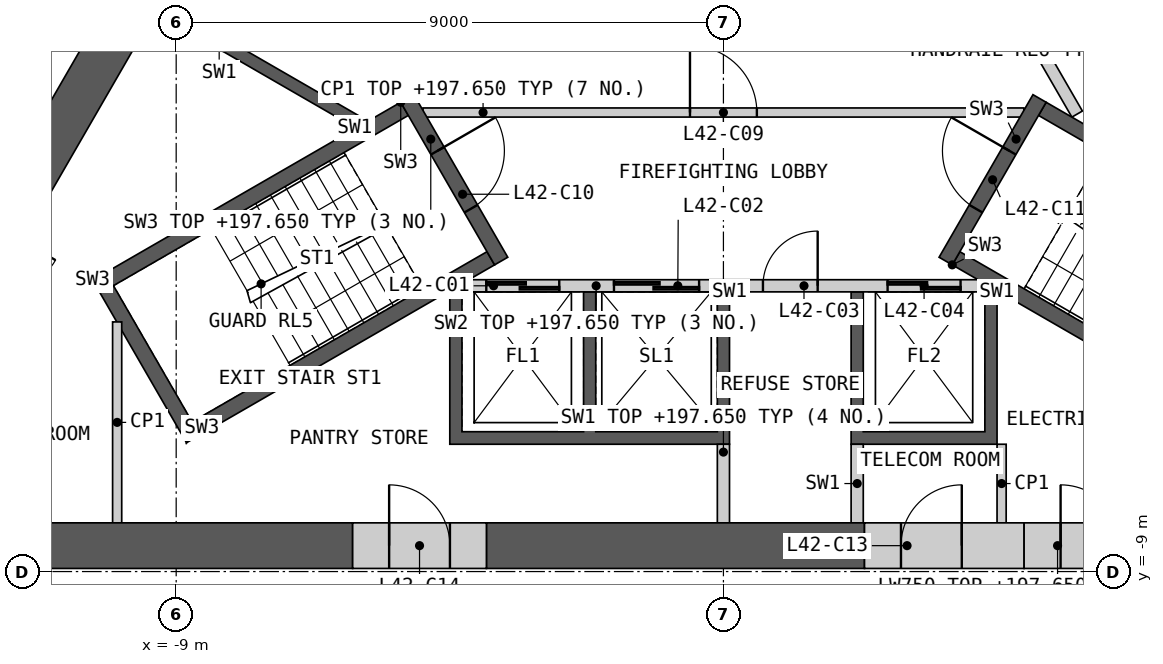
"""IFC4 building model, lengths in metres.
Left out: names, types, materials, properties, quantities, classifications, styles, units other than length and angle.
Written with IfcOpenShell. Run it as: python <this file> out.ifc"""

import sys

from ifc_helpers import new_model, si_unit, direction, frame, frame_2d, origin, place, context, subcontext, project, spatial, polyline, rectangle, outline, extrude, element, fill, save


model = new_model("IFC4")
c1 = context("Model", 3, precision=1e-05, world=origin(), true_north=direction((0.0, 1.0)))
c2 = subcontext(c1, "Body", "Model", "MODEL_VIEW")
j1 = project(units=[si_unit("LENGTHUNIT", "METRE"), si_unit("PLANEANGLEUNIT", "RADIAN")], contexts=[c1])
p1 = place(None, origin())
s1 = spatial("IfcSite", under=j1, at=p1, CompositionType="ELEMENT")
p2 = place(p1, origin())
s2 = spatial("IfcBuilding", under=s1, at=p2, CompositionType="ELEMENT")
p3 = place(p2, frame((0.0, 0.0, 194.4)))
s3 = spatial("IfcBuildingStorey", under=s2, at=p3, CompositionType="ELEMENT", Elevation=194.4)
p4 = place(p3, origin())
e1 = element("IfcWall", 1, at=p4, inside=s3, PredefinedType="SHEAR", context=c2, shape_type="SweptSolid", body=[
    extrude(outline(polyline([(4.5, -4.4), (4.5, -6.906), (2.1, -6.906), (2.1, -4.4), (2.3, -4.4), (2.3, -6.7), (4.3, -6.7), (4.3, -4.4), (4.5, -4.4)])), origin(), (0.0, 0.0, 1.0), 3.25),
])
p5 = place(p3, origin())
e2 = element("IfcWall", 2, at=p5, inside=s3, PredefinedType="SHEAR", context=c2, shape_type="SweptSolid", body=[
    extrude(outline(polyline([(0.1, -4.4), (0.1, -6.906), (-4.5, -6.906), (-4.5, -4.4), (-4.3, -4.4), (-4.3, -6.7), (-2.3, -6.7), (-2.3, -4.4), (-2.1, -4.4), (-2.1, -6.7), (-0.1, -6.7), (-0.1, -4.4), (0.1, -4.4)])), origin(), (0.0, 0.0, 1.0), 3.25),
])
p6 = place(p3, frame((-4.187, -4.3, 0.0), z_axis=(0.0, 0.0, 1.0), x_axis=(1.0, 0.0, 0.0)))
e3 = element("IfcWall", 3, at=p6, inside=s3, PredefinedType="SOLIDWALL", context=c2, shape_type="SweptSolid", body=[
    extrude(rectangle(XDim=8.373, YDim=0.2, at=frame_2d((4.187, 0.0))), origin(), (0.0, 0.0, 1.0), 3.25),
])
p7 = place(p6, frame((0.287, 0.0, 0.0)))
e4 = element("IfcOpeningElement", 4, at=p7, cuts=e3, PredefinedType="OPENING", context=c2, shape_type="SweptSolid", body=[
    extrude(rectangle(XDim=1.2, YDim=2.1, at=frame_2d((0.6, 1.05))), frame((0.0, 0.11, 0.0), z_axis=(0.0, -1.0, 0.0), x_axis=(1.0, 0.0, 0.0)), (0.0, 0.0, 1.0), 0.22),
])
p8 = place(p6, frame((2.387, 0.0, 0.0)))
e5 = element("IfcOpeningElement", 5, at=p8, cuts=e3, PredefinedType="OPENING", context=c2, shape_type="SweptSolid", body=[
    extrude(rectangle(XDim=1.4, YDim=2.1, at=frame_2d((0.7, 1.05))), frame((0.0, 0.11, 0.0), z_axis=(0.0, -1.0, 0.0), x_axis=(1.0, 0.0, 0.0)), (0.0, 0.0, 1.0), 0.22),
])
p9 = place(p6, frame((4.837, 0.0, 0.0)))
e6 = element("IfcOpeningElement", 6, at=p9, cuts=e3, PredefinedType="OPENING", context=c2, shape_type="SweptSolid", body=[
    extrude(rectangle(XDim=0.9, YDim=2.1, at=frame_2d((0.45, 1.05))), frame((0.0, 0.11, 0.0), z_axis=(0.0, -1.0, 0.0), x_axis=(1.0, 0.0, 0.0)), (0.0, 0.0, 1.0), 0.22),
])
p10 = place(p6, frame((6.887, 0.0, 0.0)))
e7 = element("IfcOpeningElement", 7, at=p10, cuts=e3, PredefinedType="OPENING", context=c2, shape_type="SweptSolid", body=[
    extrude(rectangle(XDim=1.2, YDim=2.1, at=frame_2d((0.6, 1.05))), frame((0.0, 0.11, 0.0), z_axis=(0.0, -1.0, 0.0), x_axis=(1.0, 0.0, 0.0)), (0.0, 0.0, 1.0), 0.22),
])
for number, where, z_axis, x_axis in (
    (8, (0.0, -6.906, 0.0), (0.0, 0.0, 1.0), (0.0, -1.0, 0.0)),
    (9, (2.2, -6.906, 0.0), (0.0, 0.0, 1.0), (0.0, -1.0, 0.0)),
):
    element("IfcWall", number, at=place(p3, frame(where, z_axis=z_axis, x_axis=x_axis)), inside=s3, PredefinedType="SHEAR", context=c2, shape_type="SweptSolid", body=[
        extrude(rectangle(XDim=1.293, YDim=0.2, at=frame_2d((0.646, 0.0))), origin(), (0.0, 0.0, 1.0), 3.25),
    ])
p11 = place(p3, origin())
e10 = element("IfcWall", 10, at=p11, inside=s3, PredefinedType="SHEAR", context=c2, shape_type="SweptSolid", body=[
    extrude(outline(polyline([(1.561, 6.097), (3.731, 7.35), (8.231, -0.444), (6.061, -1.697), (5.96, -1.524), (7.952, -0.374), (4.752, 5.169), (2.76, 4.019), (2.66, 4.192), (4.652, 5.342), (3.652, 7.074), (1.66, 5.924), (1.561, 6.097)])), origin(), (0.0, 0.0, 1.0), 3.25),
])
p12 = place(p3, frame((5.817, -1.476, 0.0), z_axis=(0.0, 0.0, 1.0), x_axis=(-0.500002616675, 0.866023893041, 0.0)))
e11 = element("IfcWall", 11, at=p12, inside=s3, PredefinedType="SOLIDWALL", context=c2, shape_type="SweptSolid", body=[
    extrude(rectangle(XDim=8.373, YDim=0.2, at=frame_2d((4.187, 0.0))), origin(), (0.0, 0.0, 1.0), 3.25),
])
p13 = place(p12, frame((2.637, 0.0, 0.0)))
e12 = element("IfcOpeningElement", 12, at=p13, cuts=e11, PredefinedType="OPENING", context=c2, shape_type="SweptSolid", body=[
    extrude(rectangle(XDim=0.9, YDim=2.1, at=frame_2d((0.45, 1.05))), frame((0.0, 0.11, 0.0), z_axis=(0.0, -1.0, 0.0), x_axis=(1.0, 0.0, 0.0)), (0.0, 0.0, 1.0), 0.22),
])
p14 = place(p12, frame((6.937, 0.0, 0.0)))
e13 = element("IfcOpeningElement", 13, at=p14, cuts=e11, PredefinedType="OPENING", context=c2, shape_type="SweptSolid", body=[
    extrude(rectangle(XDim=1.1, YDim=2.1, at=frame_2d((0.55, 1.05))), frame((0.0, 0.11, 0.0), z_axis=(0.0, -1.0, 0.0), x_axis=(1.0, 0.0, 0.0)), (0.0, 0.0, 1.0), 0.22),
])
p15 = place(p3, origin())
e14 = element("IfcWall", 14, at=p15, inside=s3, PredefinedType="SHEAR", context=c2, shape_type="SweptSolid", body=[
    extrude(outline(polyline([(-6.061, -1.697), (-8.231, -0.444), (-8.131, -0.271), (-5.96, -1.524), (-6.061, -1.697)])), origin(), (0.0, 0.0, 1.0), 3.25),
])
p16 = place(p3, frame((-4.941, -1.45, 0.0), z_axis=(0.0, 0.0, 1.0), x_axis=(1.0, 0.0, 0.0)))
e15 = element("IfcWall", 15, at=p16, inside=s3, PredefinedType="PARTITIONING", context=c2, shape_type="SweptSolid", body=[
    extrude(rectangle(XDim=9.882, YDim=0.15, at=frame_2d((4.941, 0.0))), origin(), (0.0, 0.0, 1.0), 3.25),
])
p17 = place(p16, frame((4.391, 0.0, 0.0)))
e16 = element("IfcOpeningElement", 16, at=p17, cuts=e15, PredefinedType="OPENING", context=c2, shape_type="SweptSolid", body=[
    extrude(rectangle(XDim=1.1, YDim=2.1, at=frame_2d((0.55, 1.05))), frame((0.0, 0.085, 0.0), z_axis=(0.0, -1.0, 0.0), x_axis=(1.0, 0.0, 0.0)), (0.0, 0.0, 1.0), 0.17),
])
p18 = place(p3, origin())
e17 = element("IfcWall", 17, at=p18, inside=s3, PredefinedType="SHEAR", context=c2, shape_type="SweptSolid", body=[
    extrude(outline(polyline([(-5.307, -1.281), (-10.374, -4.206), (-10.032, -4.298), (-5.182, -1.498), (-5.307, -1.281)])), origin(), (0.0, 0.0, 1.0), 3.25),
])
p19 = place(p3, origin())
e18 = element("IfcWall", 18, at=p19, inside=s3, PredefinedType="SHEAR", context=c2, shape_type="SweptSolid", body=[
    extrude(outline(polyline([(-10.374, -4.206), (-8.83, -6.881), (-8.738, -6.539), (-10.032, -4.298), (-10.374, -4.206)])), origin(), (0.0, 0.0, 1.0), 3.25),
])
p20 = place(p3, origin())
e19 = element("IfcWall", 19, at=p20, inside=s3, PredefinedType="SHEAR", context=c2, shape_type="SweptSolid", body=[
    extrude(outline(polyline([(-8.738, -6.539), (-8.83, -6.881), (-3.763, -3.956), (-3.888, -3.739), (-8.738, -6.539)])), origin(), (0.0, 0.0, 1.0), 3.25),
])
p21 = place(p3, frame((-5.199, -1.219, 0.0), z_axis=(0.0, 0.0, 1.0), x_axis=(0.499982516597, -0.866035497597, 0.0)))
e20 = element("IfcWall", 20, at=p21, inside=s3, PredefinedType="SHEAR", context=c2, shape_type="SweptSolid", body=[
    extrude(rectangle(XDim=3.088, YDim=0.25, at=frame_2d((1.544, 0.0))), origin(), (0.0, 0.0, 1.0), 3.25),
])
p22 = place(p21, frame((0.994, 0.0, 0.0)))
e21 = element("IfcOpeningElement", 21, at=p22, cuts=e20, PredefinedType="OPENING", context=c2, shape_type="SweptSolid", body=[
    extrude(rectangle(XDim=1.1, YDim=2.1, at=frame_2d((0.55, 1.05))), frame((0.0, 0.135, 0.0), z_axis=(0.0, -1.0, 0.0), x_axis=(1.0, 0.0, 0.0)), (0.0, 0.0, 1.0), 0.27),
])
p23 = place(p3, origin())
e22 = element("IfcWall", 22, at=p23, inside=s3, PredefinedType="SHEAR", context=c2, shape_type="SweptSolid", body=[
    extrude(outline(polyline([(3.763, -3.956), (8.83, -6.881), (8.738, -6.539), (3.888, -3.739), (3.763, -3.956)])), origin(), (0.0, 0.0, 1.0), 3.25),
])
p24 = place(p3, origin())
e23 = element("IfcWall", 23, at=p24, inside=s3, PredefinedType="SHEAR", context=c2, shape_type="SweptSolid", body=[
    extrude(outline(polyline([(10.032, -4.298), (10.374, -4.206), (5.307, -1.281), (5.182, -1.498), (10.032, -4.298)])), origin(), (0.0, 0.0, 1.0), 3.25),
])
p25 = place(p3, frame((3.655, -3.893, 0.0), z_axis=(0.0, 0.0, 1.0), x_axis=(0.499982516597, 0.866035497597, 0.0)))
e24 = element("IfcWall", 24, at=p25, inside=s3, PredefinedType="SHEAR", context=c2, shape_type="SweptSolid", body=[
    extrude(rectangle(XDim=3.088, YDim=0.25, at=frame_2d((1.544, 0.0))), origin(), (0.0, 0.0, 1.0), 3.25),
])
p26 = place(p25, frame((0.994, 0.0, 0.0)))
e25 = element("IfcOpeningElement", 25, at=p26, cuts=e24, PredefinedType="OPENING", context=c2, shape_type="SweptSolid", body=[
    extrude(rectangle(XDim=1.1, YDim=2.1, at=frame_2d((0.55, 1.05))), frame((0.0, 0.135, 0.0), z_axis=(0.0, -1.0, 0.0), x_axis=(1.0, 0.0, 0.0)), (0.0, 0.0, 1.0), 0.27),
])
p27 = place(p3, frame((4.575, -6.906, 0.0), z_axis=(0.0, 0.0, 1.0), x_axis=(0.0, -1.0, 0.0)))
e26 = element("IfcWall", 26, at=p27, inside=s3, PredefinedType="PARTITIONING", context=c2, shape_type="SweptSolid", body=[
    extrude(rectangle(XDim=1.293, YDim=0.15, at=frame_2d((0.646, 0.0))), origin(), (0.0, 0.0, 1.0), 3.25),
])
p28 = place(p3, frame((-9.971, -8.199, 0.0), z_axis=(0.0, 0.0, 1.0), x_axis=(0.0, 1.0, 0.0)))
e27 = element("IfcWall", 27, at=p28, inside=s3, PredefinedType="PARTITIONING", context=c2, shape_type="SweptSolid", body=[
    extrude(rectangle(XDim=3.305, YDim=0.15, at=frame_2d((1.652, 0.0))), origin(), (0.0, 0.0, 1.0), 3.25),
])
p29 = place(p3, frame((-14.201, -8.574, 0.0), z_axis=(0.0, 0.0, 1.0), x_axis=(1.0, 0.0, 0.0)))
e28 = element("IfcWall", 28, at=p29, inside=s3, PredefinedType="SHEAR", context=c2, shape_type="SweptSolid", body=[
    extrude(rectangle(XDim=8.103, YDim=0.75, at=frame_2d((4.052, 0.0))), origin(), (0.0, 0.0, 1.0), 3.25),
])
p30 = place(p3, frame((-3.898, -8.574, 0.0), z_axis=(0.0, 0.0, 1.0), x_axis=(1.0, 0.0, 0.0)))
e29 = element("IfcWall", 29, at=p30, inside=s3, PredefinedType="SHEAR", context=c2, shape_type="SweptSolid", body=[
    extrude(rectangle(XDim=6.218, YDim=0.75, at=frame_2d((3.109, 0.0))), origin(), (0.0, 0.0, 1.0), 3.25),
])
p31 = place(p3, frame((-9.625, 0.477, 0.0), z_axis=(0.0, 0.0, 1.0), x_axis=(-0.499951145694, -0.866053607994, 0.0)))
e30 = element("IfcWall", 30, at=p31, inside=s3, PredefinedType="SHEAR", context=c2, shape_type="SweptSolid", body=[
    extrude(rectangle(XDim=3.851, YDim=0.75, at=frame_2d((1.925, 0.0))), origin(), (0.0, 0.0, 1.0), 3.25),
])
p32 = place(p3, frame((2.32, -8.574, 0.0), z_axis=(0.0, 0.0, 1.0), x_axis=(1.0, 0.0, 0.0)))
e31 = element("IfcWall", 31, at=p32, inside=s3, PredefinedType="SHEAR", context=c2, shape_type="SweptSolid", body=[
    extrude(rectangle(XDim=2.625, YDim=0.75, at=frame_2d((1.312, 0.0))), origin(), (0.0, 0.0, 1.0), 3.25),
])
p33 = place(p32, frame((0.6, 0.0, 0.0)))
e32 = element("IfcOpeningElement", 32, at=p33, cuts=e31, PredefinedType="OPENING", context=c2, shape_type="SweptSolid", body=[
    extrude(rectangle(XDim=1.0, YDim=2.1, at=frame_2d((0.5, 1.05))), frame((0.0, 0.385, 0.0), z_axis=(0.0, -1.0, 0.0), x_axis=(1.0, 0.0, 0.0)), (0.0, 0.0, 1.0), 0.77),
])
p34 = place(p3, frame((-6.098, -8.574, 0.0), z_axis=(0.0, 0.0, 1.0), x_axis=(1.0, 0.0, 0.0)))
e33 = element("IfcWall", 33, at=p34, inside=s3, PredefinedType="SHEAR", context=c2, shape_type="SweptSolid", body=[
    extrude(rectangle(XDim=2.2, YDim=0.75, at=frame_2d((1.1, 0.0))), origin(), (0.0, 0.0, 1.0), 3.25),
])
p35 = place(p34, frame((0.6, 0.0, 0.0)))
e34 = element("IfcOpeningElement", 34, at=p35, cuts=e33, PredefinedType="OPENING", context=c2, shape_type="SweptSolid", body=[
    extrude(rectangle(XDim=1.0, YDim=2.1, at=frame_2d((0.5, 1.05))), frame((0.0, 0.385, 0.0), z_axis=(0.0, -1.0, 0.0), x_axis=(1.0, 0.0, 0.0)), (0.0, 0.0, 1.0), 0.77),
])
p36 = place(p3, frame((4.945, -8.574, 0.0), z_axis=(0.0, 0.0, 1.0), x_axis=(1.0, 0.0, 0.0)))
e35 = element("IfcWall", 35, at=p36, inside=s3, PredefinedType="SHEAR", context=c2, shape_type="SweptSolid", body=[
    extrude(rectangle(XDim=2.2, YDim=0.75, at=frame_2d((1.1, 0.0))), origin(), (0.0, 0.0, 1.0), 3.25),
])
p37 = place(p36, frame((0.6, 0.0, 0.0)))
e36 = element("IfcOpeningElement", 36, at=p37, cuts=e35, PredefinedType="OPENING", context=c2, shape_type="SweptSolid", body=[
    extrude(rectangle(XDim=1.0, YDim=2.1, at=frame_2d((0.5, 1.05))), frame((0.0, 0.385, 0.0), z_axis=(0.0, -1.0, 0.0), x_axis=(1.0, 0.0, 0.0)), (0.0, 0.0, 1.0), 0.77),
])
p38 = place(p3, frame((-19.476, -5.035, 0.0), z_axis=(0.0, 0.0, 1.0), x_axis=(0.500000757641, 0.86602496636, 0.0)))
e37 = element("IfcWall", 37, at=p38, inside=s3, PredefinedType="PARTITIONING", context=c2, shape_type="SweptSolid", body=[
    extrude(rectangle(XDim=28.198, YDim=0.2, at=frame_2d((14.099, 0.0))), origin(), (0.0, 0.0, 1.0), 3.25),
])
p39 = place(p38, frame((25.796, 0.0, 0.0)))
e38 = element("IfcOpeningElement", 38, at=p39, cuts=e37, PredefinedType="OPENING", context=c2, shape_type="SweptSolid", body=[
    extrude(rectangle(XDim=0.95, YDim=2.1, at=frame_2d((0.475, 1.05))), frame((0.0, 0.11, 0.0), z_axis=(0.0, -1.0, 0.0), x_axis=(1.0, 0.0, 0.0)), (0.0, 0.0, 1.0), 0.22),
])
p40 = place(p38, frame((14.603, 0.0, 0.0)))
e39 = element("IfcOpeningElement", 39, at=p40, cuts=e37, PredefinedType="OPENING", context=c2, shape_type="SweptSolid", body=[
    extrude(rectangle(XDim=1.1, YDim=2.1, at=frame_2d((0.55, 1.05))), frame((0.0, 0.11, 0.0), z_axis=(0.0, -1.0, 0.0), x_axis=(1.0, 0.0, 0.0)), (0.0, 0.0, 1.0), 0.22),
])
p41 = place(p38, frame((11.993, 0.0, 0.0)))
e40 = element("IfcOpeningElement", 40, at=p41, cuts=e37, PredefinedType="OPENING", context=c2, shape_type="SweptSolid", body=[
    extrude(rectangle(XDim=1.1, YDim=2.1, at=frame_2d((0.55, 1.05))), frame((0.0, 0.11, 0.0), z_axis=(0.0, -1.0, 0.0), x_axis=(1.0, 0.0, 0.0)), (0.0, 0.0, 1.0), 0.22),
])
p42 = place(p38, frame((1.452, 0.0, 0.0)))
e41 = element("IfcOpeningElement", 41, at=p42, cuts=e37, PredefinedType="OPENING", context=c2, shape_type="SweptSolid", body=[
    extrude(rectangle(XDim=0.95, YDim=2.1, at=frame_2d((0.475, 1.05))), frame((0.0, 0.11, 0.0), z_axis=(0.0, -1.0, 0.0), x_axis=(1.0, 0.0, 0.0)), (0.0, 0.0, 1.0), 0.22),
])
p43 = place(p7, origin())
e42 = element("IfcDoor", 42, at=p43, inside=s3, OperationType="SLIDING_TO_LEFT", PredefinedType="DOOR", context=c2, shape_type="SweptSolid", body=[
    extrude(rectangle(XDim=1.2, YDim=2.1, at=frame_2d((0.6, 1.05))), frame((0.0, 0.025, 0.0), z_axis=(0.0, -1.0, 0.0), x_axis=(1.0, 0.0, 0.0)), (0.0, 0.0, 1.0), 0.05),
])
fill(e4, e42)
p44 = place(p8, origin())
e43 = element("IfcDoor", 43, at=p44, inside=s3, OperationType="SLIDING_TO_LEFT", PredefinedType="DOOR", context=c2, shape_type="SweptSolid", body=[
    extrude(rectangle(XDim=1.4, YDim=2.1, at=frame_2d((0.7, 1.05))), frame((0.0, 0.025, 0.0), z_axis=(0.0, -1.0, 0.0), x_axis=(1.0, 0.0, 0.0)), (0.0, 0.0, 1.0), 0.05),
])
fill(e5, e43)
p45 = place(p9, origin())
e44 = element("IfcDoor", 44, at=p45, inside=s3, OperationType="SINGLE_SWING_RIGHT", PredefinedType="DOOR", context=c2, shape_type="SweptSolid", body=[
    extrude(rectangle(XDim=0.9, YDim=2.1, at=frame_2d((0.45, 1.05))), frame((0.0, 0.025, 0.0), z_axis=(0.0, -1.0, 0.0), x_axis=(1.0, 0.0, 0.0)), (0.0, 0.0, 1.0), 0.05),
])
fill(e6, e44)
p46 = place(p10, origin())
e45 = element("IfcDoor", 45, at=p46, inside=s3, OperationType="SLIDING_TO_LEFT", PredefinedType="DOOR", context=c2, shape_type="SweptSolid", body=[
    extrude(rectangle(XDim=1.2, YDim=2.1, at=frame_2d((0.6, 1.05))), frame((0.0, 0.025, 0.0), z_axis=(0.0, -1.0, 0.0), x_axis=(1.0, 0.0, 0.0)), (0.0, 0.0, 1.0), 0.05),
])
fill(e7, e45)
p47 = place(p17, origin())
e46 = element("IfcDoor", 46, at=p47, inside=s3, OperationType="SINGLE_SWING_LEFT", PredefinedType="DOOR", context=c2, shape_type="SweptSolid", body=[
    extrude(rectangle(XDim=1.1, YDim=2.1, at=frame_2d((0.55, 1.05))), frame((0.0, 0.025, 0.0), z_axis=(0.0, -1.0, 0.0), x_axis=(1.0, 0.0, 0.0)), (0.0, 0.0, 1.0), 0.05),
])
fill(e16, e46)
p48 = place(p22, origin())
e47 = element("IfcDoor", 47, at=p48, inside=s3, OperationType="SINGLE_SWING_LEFT", PredefinedType="DOOR", context=c2, shape_type="SweptSolid", body=[
    extrude(rectangle(XDim=1.1, YDim=2.1, at=frame_2d((0.55, 1.05))), frame((0.0, 0.025, 0.0), z_axis=(0.0, -1.0, 0.0), x_axis=(1.0, 0.0, 0.0)), (0.0, 0.0, 1.0), 0.05),
])
fill(e21, e47)
p49 = place(p26, origin())
e48 = element("IfcDoor", 48, at=p49, inside=s3, OperationType="SINGLE_SWING_RIGHT", PredefinedType="DOOR", context=c2, shape_type="SweptSolid", body=[
    extrude(rectangle(XDim=1.1, YDim=2.1, at=frame_2d((0.55, 1.05))), frame((0.0, 0.025, 0.0), z_axis=(0.0, -1.0, 0.0), x_axis=(1.0, 0.0, 0.0)), (0.0, 0.0, 1.0), 0.05),
])
fill(e25, e48)
p50 = place(p33, origin())
e49 = element("IfcDoor", 49, at=p50, inside=s3, OperationType="SINGLE_SWING_RIGHT", PredefinedType="DOOR", context=c2, shape_type="SweptSolid", body=[
    extrude(rectangle(XDim=1.0, YDim=2.1, at=frame_2d((0.5, 1.05))), frame((0.0, 0.13, 0.0), z_axis=(0.0, -1.0, 0.0), x_axis=(1.0, 0.0, 0.0)), (0.0, 0.0, 1.0), 0.05),
])
fill(e32, e49)
p51 = place(p35, origin())
e50 = element("IfcDoor", 50, at=p51, inside=s3, OperationType="SINGLE_SWING_LEFT", PredefinedType="DOOR", context=c2, shape_type="SweptSolid", body=[
    extrude(rectangle(XDim=1.0, YDim=2.1, at=frame_2d((0.5, 1.05))), frame((0.0, 0.13, 0.0), z_axis=(0.0, -1.0, 0.0), x_axis=(1.0, 0.0, 0.0)), (0.0, 0.0, 1.0), 0.05),
])
fill(e34, e50)
p52 = place(p37, origin())
e51 = element("IfcDoor", 51, at=p52, inside=s3, OperationType="SINGLE_SWING_LEFT", PredefinedType="DOOR", context=c2, shape_type="SweptSolid", body=[
    extrude(rectangle(XDim=1.0, YDim=2.1, at=frame_2d((0.5, 1.05))), frame((0.0, 0.13, 0.0), z_axis=(0.0, -1.0, 0.0), x_axis=(1.0, 0.0, 0.0)), (0.0, 0.0, 1.0), 0.05),
])
fill(e36, e51)
save(model, sys.argv[1])
